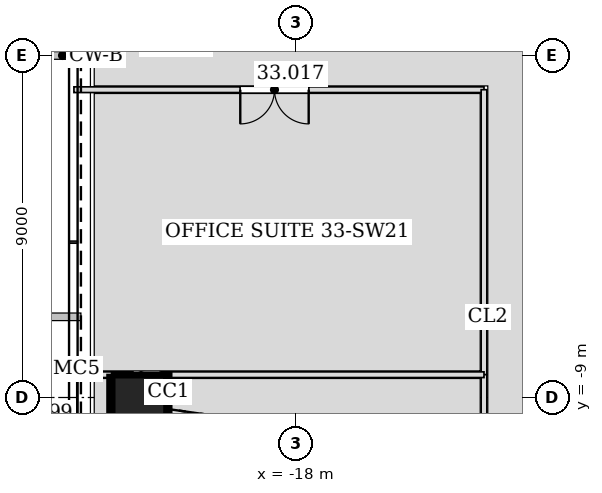
"""IFC4 building model, lengths in metres.
Left out: names, types, materials, properties, quantities, classifications, styles, units other than length and angle.
Written with IfcOpenShell. Run it as: python <this file> out.ifc"""

import sys

from ifc_helpers import new_model, si_unit, direction, frame, frame_2d, origin, origin_2d, place, context, subcontext, project, spatial, rectangle, hollow_rectangle, extrude, element, fill, save


model = new_model("IFC4")
c1 = context("Model", 3, precision=1e-05, world=origin(), true_north=direction((0.0, 1.0)))
c2 = subcontext(c1, "Body", "Model", "MODEL_VIEW")
j1 = project(units=[si_unit("LENGTHUNIT", "METRE"), si_unit("PLANEANGLEUNIT", "RADIAN")], contexts=[c1])
p1 = place(None, origin())
s1 = spatial("IfcSite", under=j1, at=p1, CompositionType="ELEMENT")
p2 = place(p1, origin())
s2 = spatial("IfcBuilding", under=s1, at=p2, CompositionType="ELEMENT")
p3 = place(p2, frame((0.0, 0.0, 147.0)))
s3 = spatial("IfcBuildingStorey", under=s2, at=p3, CompositionType="ELEMENT", Elevation=147.0)
p4 = place(p3, frame((-22.178, -9.187, 0.0), z_axis=(0.028237674468, 0.01173664659, 0.999532333078), x_axis=(-0.38380575713, 0.923413851312, 0.0)))
e1 = element("IfcColumn", 1, at=p4, inside=s3, PredefinedType="COLUMN", context=c2, shape_type="SweptSolid", body=[
    extrude(hollow_rectangle(XDim=1.5, YDim=1.5, WallThickness=0.07, at=origin_2d()), origin(), (0.0, 0.0, 1.0), 4.202),
])
p5 = place(p3, frame((-23.056, 0.0, 0.0), z_axis=(0.028297679255, 0.0, 0.99959954049), x_axis=(0.0, 1.0, 0.0)))
e2 = element("IfcColumn", 2, at=p5, inside=s3, PredefinedType="COLUMN", context=c2, shape_type="SweptSolid", body=[
    extrude(hollow_rectangle(XDim=0.5, YDim=0.5, WallThickness=0.025, at=origin_2d()), origin(), (0.0, 0.0, 1.0), 4.202),
])
p6 = place(p3, frame((-23.84, -0.9, 0.0), z_axis=(0.0, 0.0, 1.0), x_axis=(1.0, 0.0, 0.0)))
e3 = element("IfcWall", 3, at=p6, inside=s3, PredefinedType="PARTITIONING", context=c2, shape_type="SweptSolid", body=[
    extrude(rectangle(XDim=10.79, YDim=0.15, at=frame_2d((5.395, 0.0))), origin(), (0.0, 0.0, 1.0), 3.426),
])
p7 = place(p6, frame((4.377, 0.0, 0.0)))
e4 = element("IfcOpeningElement", 4, at=p7, cuts=e3, PredefinedType="OPENING", context=c2, shape_type="SweptSolid", body=[
    extrude(rectangle(XDim=1.8, YDim=2.4, at=frame_2d((0.9, 1.2))), frame((0.0, 0.085, 0.0), z_axis=(0.0, -1.0, 0.0), x_axis=(1.0, 0.0, 0.0)), (0.0, 0.0, 1.0), 0.17),
])
p8 = place(p3, frame((-13.05, -0.9, 0.0), z_axis=(0.0, 0.0, 1.0), x_axis=(0.0, -1.0, 0.0)))
e5 = element("IfcWall", 5, at=p8, inside=s3, PredefinedType="PARTITIONING", context=c2, shape_type="SweptSolid", body=[
    extrude(rectangle(XDim=7.501, YDim=0.15, at=frame_2d((3.75, 0.0))), origin(), (0.0, 0.0, 1.0), 4.035),
])
p9 = place(p3, frame((-13.05, -8.399, 0.0), z_axis=(0.0, 0.0, 1.0), x_axis=(0.0, -1.0, 0.0)))
e6 = element("IfcWall", 6, at=p9, inside=s3, PredefinedType="PARTITIONING", context=c2, shape_type="SweptSolid", body=[
    extrude(rectangle(XDim=4.651, YDim=0.15, at=frame_2d((2.326, 0.0))), origin(), (0.0, 0.0, 1.0), 3.098),
])
p10 = place(p9, frame((1.426, 0.0, 0.0)))
e7 = element("IfcOpeningElement", 7, at=p10, cuts=e6, PredefinedType="OPENING", context=c2, shape_type="SweptSolid", body=[
    extrude(rectangle(XDim=1.8, YDim=2.4, at=frame_2d((0.9, 1.2))), frame((0.0, 0.085, 0.0), z_axis=(0.0, -1.0, 0.0), x_axis=(1.0, 0.0, 0.0)), (0.0, 0.0, 1.0), 0.17),
])
p11 = place(p3, frame((-23.838, -8.4, 0.0), z_axis=(0.0, 0.0, 1.0), x_axis=(1.0, 0.0, 0.0)))
e8 = element("IfcWall", 8, at=p11, inside=s3, PredefinedType="PARTITIONING", context=c2, shape_type="SweptSolid", body=[
    extrude(rectangle(XDim=1.55, YDim=0.15, at=frame_2d((0.775, 0.0))), origin(), (0.0, 0.0, 1.0), 4.035),
])
p12 = place(p3, frame((-21.532, -8.4, 0.0), z_axis=(0.0, 0.0, 1.0), x_axis=(1.0, 0.0, 0.0)))
e9 = element("IfcWall", 9, at=p12, inside=s3, PredefinedType="PARTITIONING", context=c2, shape_type="SweptSolid", body=[
    extrude(rectangle(XDim=8.482, YDim=0.15, at=frame_2d((4.241, 0.0))), origin(), (0.0, 0.0, 1.0), 3.426),
])
p13 = place(p7, frame((1.8, 0.0, 0.0), z_axis=(0.0, 0.0, 1.0), x_axis=(-1.0, 0.0, 0.0)))
e10 = element("IfcDoor", 10, at=p13, inside=s3, OperationType="DOUBLE_DOOR_SINGLE_SWING", PredefinedType="DOOR", context=c2, shape_type="SweptSolid", body=[
    extrude(rectangle(XDim=1.8, YDim=2.4, at=frame_2d((0.9, 1.2))), frame((0.0, 0.025, 0.0), z_axis=(0.0, -1.0, 0.0), x_axis=(1.0, 0.0, 0.0)), (0.0, 0.0, 1.0), 0.05),
])
fill(e4, e10)
save(model, sys.argv[1])
